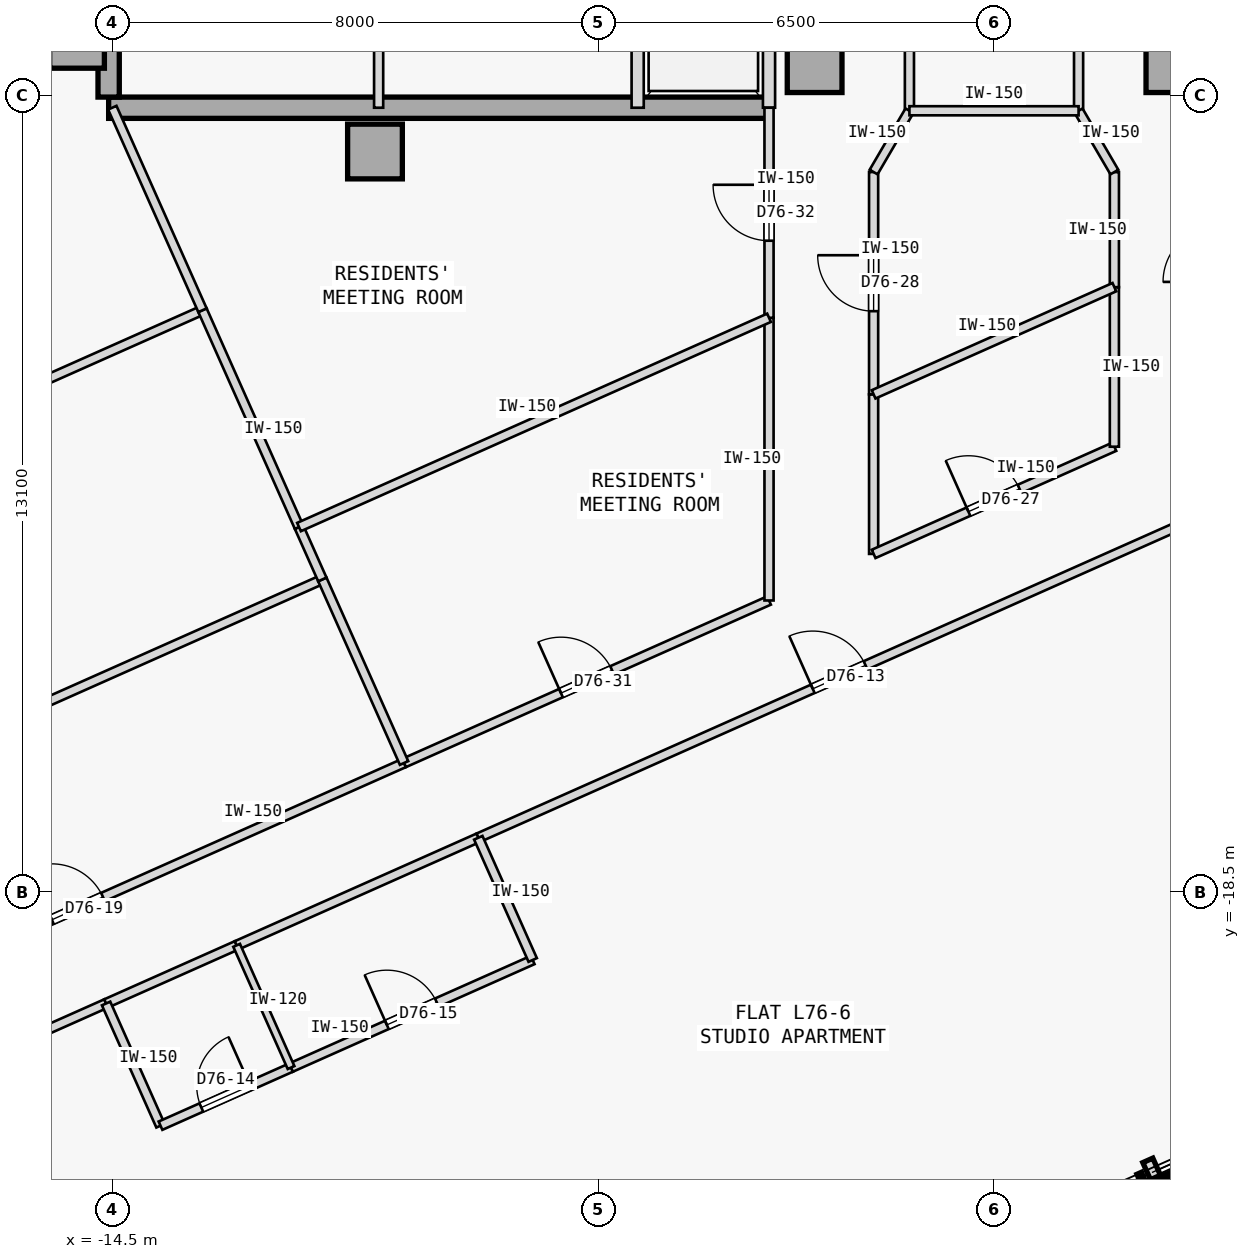
"""IFC4 building model, lengths in metres.
Left out: names, types, materials, properties, quantities, classifications, styles, units other than length and angle.
Written with IfcOpenShell. Run it as: python <this file> out.ifc"""

import sys

from ifc_helpers import new_model, si_unit, direction, frame, frame_2d, origin, origin_2d, place, context, subcontext, project, spatial, rectangle, extrude, element, fill, save


model = new_model("IFC4")
c1 = context("Model", 3, precision=1e-05, world=origin(), true_north=direction((0.0, 1.0)))
c2 = subcontext(c1, "Body", "Model", "MODEL_VIEW")
j1 = project(units=[si_unit("LENGTHUNIT", "METRE"), si_unit("PLANEANGLEUNIT", "RADIAN")], contexts=[c1])
p1 = place(None, origin())
s1 = spatial("IfcSite", under=j1, at=p1, CompositionType="ELEMENT")
p2 = place(p1, origin())
s2 = spatial("IfcBuilding", under=s1, at=p2, CompositionType="ELEMENT")
p3 = place(p2, frame((0.0, 0.0, 285.25)))
s3 = spatial("IfcBuildingStorey", under=s2, at=p3, CompositionType="ELEMENT", Elevation=285.25)
for number, where, z_axis, x_axis in (
    (1, (-15.08, -4.5, 0.0), (0.0, 0.0, 1.0), (1.0, 0.0, 0.0)),
    (2, (-10.18, -6.32, 0.0), (0.0, 0.0, 1.0), (1.0, 0.0, 0.0)),
    (3, (-2.95, -4.9, 0.0), (0.0, 0.0, 1.0), (1.0, 0.0, 0.0)),
    (4, (2.95, -4.9, 0.0), (0.0, 0.0, 1.0), (1.0, 0.0, 0.0)),
):
    element("IfcColumn", number, at=place(p3, frame(where, z_axis=z_axis, x_axis=x_axis)), inside=s3, PredefinedType="COLUMN", context=c2, shape_type="SweptSolid", body=[
        extrude(rectangle(XDim=0.9, YDim=0.9, at=origin_2d()), origin(), (0.0, 0.0, 1.0), 3.35),
    ])
p4 = place(p3, frame((-14.56, -5.6, 0.0), z_axis=(0.0, 0.0, 1.0), x_axis=(1.0, 0.0, 0.0)))
e5 = element("IfcWall", 5, at=p4, inside=s3, PredefinedType="SHEAR", context=c2, shape_type="SweptSolid", body=[
    extrude(rectangle(XDim=10.86, YDim=0.35, at=frame_2d((5.43, 0.0))), origin(), (0.0, 0.0, 1.0), 3.125),
])
p5 = place(p3, frame((-14.56, -5.425, 0.0), z_axis=(0.0, 0.0, 1.0), x_axis=(0.0, 1.0, 0.0)))
e6 = element("IfcWall", 6, at=p5, inside=s3, PredefinedType="SHEAR", context=c2, shape_type="SweptSolid", body=[
    extrude(rectangle(XDim=10.85, YDim=0.35, at=frame_2d((5.425, 0.0))), origin(), (0.0, 0.0, 1.0), 3.125),
])
for number, where, z_axis, x_axis in (
    (7, (-3.7, -5.6, 0.0), (0.0, 0.0, 1.0), (0.0, 1.0, 0.0)),
    (8, (-5.86, -5.6, 0.0), (0.0, 0.0, 1.0), (0.0, 1.0, 0.0)),
):
    element("IfcWall", number, at=place(p3, frame(where, z_axis=z_axis, x_axis=x_axis)), inside=s3, PredefinedType="STANDARD", context=c2, shape_type="SweptSolid", body=[
        extrude(rectangle(XDim=2.65, YDim=0.2, at=frame_2d((1.325, 0.0))), origin(), (0.0, 0.0, 1.0), 3.125),
    ])
p6 = place(p3, frame((-10.12, -5.6, 0.0), z_axis=(0.0, 0.0, 1.0), x_axis=(0.0, 1.0, 0.0)))
e9 = element("IfcWall", 9, at=p6, inside=s3, PredefinedType="PARTITIONING", context=c2, shape_type="SweptSolid", body=[
    extrude(rectangle(XDim=2.65, YDim=0.15, at=frame_2d((1.325, 0.0))), origin(), (0.0, 0.0, 1.0), 3.125),
])
p7 = place(p3, frame((-1.391, -5.65, 0.0), z_axis=(0.0, 0.0, 1.0), x_axis=(-2.1605738e-05, 0.999999999767, 0.0)))
e10 = element("IfcWall", 10, at=p7, inside=s3, PredefinedType="PARTITIONING", context=c2, shape_type="SweptSolid", body=[
    extrude(rectangle(XDim=11.3, YDim=0.15, at=frame_2d((5.65, 0.0))), origin(), (0.0, 0.0, 1.0), 3.125),
])
p8 = place(p3, frame((1.391, -5.65, 0.0), z_axis=(0.0, 0.0, 1.0), x_axis=(4.3206809e-05, 0.999999999067, 0.0)))
e11 = element("IfcWall", 11, at=p8, inside=s3, PredefinedType="PARTITIONING", context=c2, shape_type="SweptSolid", body=[
    extrude(rectangle(XDim=11.301, YDim=0.15, at=frame_2d((5.65, 0.0))), origin(), (0.0, 0.0, 1.0), 3.125),
])
p9 = place(p8, frame((5.176, 0.0, 0.0)))
e12 = element("IfcOpeningElement", 12, at=p9, cuts=e11, PredefinedType="OPENING", context=c2, shape_type="SweptSolid", body=[
    extrude(rectangle(XDim=0.95, YDim=2.15, at=frame_2d((0.475, 1.075))), frame((0.0, 0.085, 0.0), z_axis=(0.0, -1.0, 0.0), x_axis=(1.0, 0.0, 0.0)), (0.0, 0.0, 1.0), 0.17),
])
p10 = place(p3, frame((-19.786, -22.639, 0.0), z_axis=(0.0, 0.0, 1.0), x_axis=(0.913559465571, 0.406705179295, 0.0)))
e13 = element("IfcWall", 13, at=p10, inside=s3, PredefinedType="PARTITIONING", context=c2, shape_type="SweptSolid", body=[
    extrude(rectangle(XDim=5.675, YDim=0.15, at=frame_2d((2.837, 0.0))), origin(), (0.0, 0.0, 1.0), 3.125),
])
p11 = place(p3, frame((-8.481, -17.605, 0.0), z_axis=(0.0, 0.0, 1.0), x_axis=(0.913546352883, 0.406734632328, 0.0)))
e14 = element("IfcWall", 14, at=p11, inside=s3, PredefinedType="PARTITIONING", context=c2, shape_type="SweptSolid", body=[
    extrude(rectangle(XDim=12.993, YDim=0.15, at=frame_2d((6.497, 0.0))), origin(), (0.0, 0.0, 1.0), 3.125),
])
p12 = place(p11, frame((6.021, 0.0, 0.0)))
e15 = element("IfcOpeningElement", 15, at=p12, cuts=e14, PredefinedType="OPENING", context=c2, shape_type="SweptSolid", body=[
    extrude(rectangle(XDim=0.95, YDim=2.15, at=frame_2d((0.475, 1.075))), frame((0.0, 0.085, 0.0), z_axis=(0.0, -1.0, 0.0), x_axis=(1.0, 0.0, 0.0)), (0.0, 0.0, 1.0), 0.17),
])
p13 = place(p3, frame((-14.602, -20.331, 0.0), z_axis=(0.0, 0.0, 1.0), x_axis=(0.913502828817, 0.406832375486, 0.0)))
e16 = element("IfcWall", 16, at=p13, inside=s3, PredefinedType="PARTITIONING", context=c2, shape_type="SweptSolid", body=[
    extrude(rectangle(XDim=2.35, YDim=0.15, at=frame_2d((1.175, 0.0))), origin(), (0.0, 0.0, 1.0), 3.125),
])
p14 = place(p3, frame((-12.455, -19.375, 0.0), z_axis=(0.0, 0.0, 1.0), x_axis=(0.913545193015, 0.406737237438, 0.0)))
e17 = element("IfcWall", 17, at=p14, inside=s3, PredefinedType="PARTITIONING", context=c2, shape_type="SweptSolid", body=[
    extrude(rectangle(XDim=4.35, YDim=0.15, at=frame_2d((2.175, 0.0))), origin(), (0.0, 0.0, 1.0), 3.125),
])
p15 = place(p3, frame((-20.445, -21.159, 0.0), z_axis=(0.0, 0.0, 1.0), x_axis=(0.913547681516, 0.406731648137, 0.0)))
e18 = element("IfcWall", 18, at=p15, inside=s3, PredefinedType="PARTITIONING", context=c2, shape_type="SweptSolid", body=[
    extrude(rectangle(XDim=11.76, YDim=0.15, at=frame_2d((5.88, 0.0))), origin(), (0.0, 0.0, 1.0), 3.125),
])
p16 = place(p15, frame((5.42, 0.0, 0.0)))
e19 = element("IfcOpeningElement", 19, at=p16, cuts=e18, PredefinedType="OPENING", context=c2, shape_type="SweptSolid", body=[
    extrude(rectangle(XDim=0.92, YDim=2.15, at=frame_2d((0.46, 1.075))), frame((0.0, 0.085, 0.0), z_axis=(0.0, -1.0, 0.0), x_axis=(1.0, 0.0, 0.0)), (0.0, 0.0, 1.0), 0.17),
])
p17 = place(p3, frame((-1.98, -12.938, 0.0), z_axis=(0.0, 0.0, 1.0), x_axis=(-9.3049223e-05, 0.999999995671, 0.0)))
e20 = element("IfcWall", 20, at=p17, inside=s3, PredefinedType="PARTITIONING", context=c2, shape_type="SweptSolid", body=[
    extrude(rectangle(XDim=2.624, YDim=0.15, at=frame_2d((1.312, 0.0))), origin(), (0.0, 0.0, 1.0), 3.125),
])
p18 = place(p3, frame((-1.98, -12.938, 0.0), z_axis=(0.0, 0.0, 1.0), x_axis=(0.913530252303, 0.406770793111, 0.0)))
e21 = element("IfcWall", 21, at=p18, inside=s3, PredefinedType="PARTITIONING", context=c2, shape_type="SweptSolid", body=[
    extrude(rectangle(XDim=4.334, YDim=0.15, at=frame_2d((2.167, 0.0))), origin(), (0.0, 0.0, 1.0), 3.125),
])
p19 = place(p18, frame((1.707, 0.0, 0.0)))
e22 = element("IfcOpeningElement", 22, at=p19, cuts=e21, PredefinedType="OPENING", context=c2, shape_type="SweptSolid", body=[
    extrude(rectangle(XDim=0.92, YDim=2.15, at=frame_2d((0.46, 1.075))), frame((0.0, 0.085, 0.0), z_axis=(0.0, -1.0, 0.0), x_axis=(1.0, 0.0, 0.0)), (0.0, 0.0, 1.0), 0.17),
])
p20 = place(p3, frame((1.979, -11.175, 0.0), z_axis=(0.0, 0.0, 1.0), x_axis=(0.0, 1.0, 0.0)))
e23 = element("IfcWall", 23, at=p20, inside=s3, PredefinedType="PARTITIONING", context=c2, shape_type="SweptSolid", body=[
    extrude(rectangle(XDim=2.624, YDim=0.15, at=frame_2d((1.312, 0.0))), origin(), (0.0, 0.0, 1.0), 3.125),
])
p21 = place(p3, frame((-1.98, -10.314, 0.0), z_axis=(0.0, 0.0, 1.0), x_axis=(0.0, 1.0, 0.0)))
e24 = element("IfcWall", 24, at=p21, inside=s3, PredefinedType="PARTITIONING", context=c2, shape_type="SweptSolid", body=[
    extrude(rectangle(XDim=3.656, YDim=0.15, at=frame_2d((1.828, 0.0))), origin(), (0.0, 0.0, 1.0), 3.125),
])
p22 = place(p21, frame((1.368, 0.0, 0.0)))
e25 = element("IfcOpeningElement", 25, at=p22, cuts=e24, PredefinedType="OPENING", context=c2, shape_type="SweptSolid", body=[
    extrude(rectangle(XDim=0.92, YDim=2.15, at=frame_2d((0.46, 1.075))), frame((0.0, 0.085, 0.0), z_axis=(0.0, -1.0, 0.0), x_axis=(1.0, 0.0, 0.0)), (0.0, 0.0, 1.0), 0.17),
])
p23 = place(p3, frame((-1.98, -6.658, 0.0), z_axis=(0.0, 0.0, 1.0), x_axis=(0.504651025514, 0.863323428645, 0.0)))
e26 = element("IfcWall", 26, at=p23, inside=s3, PredefinedType="PARTITIONING", context=c2, shape_type="SweptSolid", body=[
    extrude(rectangle(XDim=1.167, YDim=0.15, at=frame_2d((0.584, 0.0))), origin(), (0.0, 0.0, 1.0), 3.125),
])
p24 = place(p3, frame((1.979, -8.551, 0.0), z_axis=(0.0, 0.0, 1.0), x_axis=(0.00025809781, 0.999999966693, 0.0)))
e27 = element("IfcWall", 27, at=p24, inside=s3, PredefinedType="PARTITIONING", context=c2, shape_type="SweptSolid", body=[
    extrude(rectangle(XDim=1.892, YDim=0.15, at=frame_2d((0.946, 0.0))), origin(), (0.0, 0.0, 1.0), 3.125),
])
p25 = place(p3, frame((1.391, -5.65, 0.0), z_axis=(0.0, 0.0, 1.0), x_axis=(0.504339173621, -0.863505644424, 0.0)))
e28 = element("IfcWall", 28, at=p25, inside=s3, PredefinedType="PARTITIONING", context=c2, shape_type="SweptSolid", body=[
    extrude(rectangle(XDim=1.167, YDim=0.15, at=frame_2d((0.583, 0.0))), origin(), (0.0, 0.0, 1.0), 3.125),
])
p26 = place(p3, frame((-9.702, -16.375, 0.0), z_axis=(0.0, 0.0, 1.0), x_axis=(0.913552389019, 0.406721074594, 0.0)))
e29 = element("IfcWall", 29, at=p26, inside=s3, PredefinedType="PARTITIONING", context=c2, shape_type="SweptSolid", body=[
    extrude(rectangle(XDim=6.57, YDim=0.15, at=frame_2d((3.285, 0.0))), origin(), (0.0, 0.0, 1.0), 3.125),
])
p27 = place(p26, frame((2.825, 0.0, 0.0)))
e30 = element("IfcOpeningElement", 30, at=p27, cuts=e29, PredefinedType="OPENING", context=c2, shape_type="SweptSolid", body=[
    extrude(rectangle(XDim=0.92, YDim=2.15, at=frame_2d((0.46, 1.075))), frame((0.0, 0.085, 0.0), z_axis=(0.0, -1.0, 0.0), x_axis=(1.0, 0.0, 0.0)), (0.0, 0.0, 1.0), 0.17),
])
p28 = place(p3, frame((-3.7, -13.703, 0.0), z_axis=(0.0, 0.0, 1.0), x_axis=(5.2512734e-05, 0.999999998621, 0.0)))
e31 = element("IfcWall", 31, at=p28, inside=s3, PredefinedType="PARTITIONING", context=c2, shape_type="SweptSolid", body=[
    extrude(rectangle(XDim=4.649, YDim=0.15, at=frame_2d((2.325, 0.0))), origin(), (0.0, 0.0, 1.0), 3.125),
])
p29 = place(p3, frame((-3.7, -9.054, 0.0), z_axis=(0.0, 0.0, 1.0), x_axis=(-7.0671378e-05, 0.999999997503, 0.0)))
e32 = element("IfcWall", 32, at=p29, inside=s3, PredefinedType="PARTITIONING", context=c2, shape_type="SweptSolid", body=[
    extrude(rectangle(XDim=3.455, YDim=0.15, at=frame_2d((1.727, 0.0))), origin(), (0.0, 0.0, 1.0), 3.125),
])
p30 = place(p29, frame((1.267, 0.0, 0.0)))
e33 = element("IfcOpeningElement", 33, at=p30, cuts=e32, PredefinedType="OPENING", context=c2, shape_type="SweptSolid", body=[
    extrude(rectangle(XDim=0.92, YDim=2.15, at=frame_2d((0.46, 1.075))), frame((0.0, 0.085, 0.0), z_axis=(0.0, -1.0, 0.0), x_axis=(1.0, 0.0, 0.0)), (0.0, 0.0, 1.0), 0.17),
])
p31 = place(p3, frame((-1.391, -5.65, 0.0), z_axis=(0.0, 0.0, 1.0), x_axis=(0.999999984594, -0.000175530979, 0.0)))
e34 = element("IfcWall", 34, at=p31, inside=s3, PredefinedType="PARTITIONING", context=c2, shape_type="SweptSolid", body=[
    extrude(rectangle(XDim=2.782, YDim=0.15, at=frame_2d((1.391, 0.0))), origin(), (0.0, 0.0, 1.0), 3.125),
])
p32 = place(p3, frame((-13.707, -22.34, 0.0), z_axis=(0.0, 0.0, 1.0), x_axis=(-0.406725294076, 0.913550510459, 0.0)))
e35 = element("IfcWall", 35, at=p32, inside=s3, PredefinedType="PARTITIONING", context=c2, shape_type="SweptSolid", body=[
    extrude(rectangle(XDim=2.2, YDim=0.15, at=frame_2d((1.1, 0.0))), origin(), (0.0, 0.0, 1.0), 3.125),
])
p33 = place(p3, frame((-13.707, -22.34, 0.0), z_axis=(0.0, 0.0, 1.0), x_axis=(0.913541436194, 0.406745675276, 0.0)))
e36 = element("IfcWall", 36, at=p33, inside=s3, PredefinedType="PARTITIONING", context=c2, shape_type="SweptSolid", body=[
    extrude(rectangle(XDim=2.35, YDim=0.15, at=frame_2d((1.175, 0.0))), origin(), (0.0, 0.0, 1.0), 3.125),
])
p34 = place(p33, frame((0.735, 0.0, 0.0)))
e37 = element("IfcOpeningElement", 37, at=p34, cuts=e36, PredefinedType="OPENING", context=c2, shape_type="SweptSolid", body=[
    extrude(rectangle(XDim=0.88, YDim=2.15, at=frame_2d((0.44, 1.075))), frame((0.0, 0.085, 0.0), z_axis=(0.0, -1.0, 0.0), x_axis=(1.0, 0.0, 0.0)), (0.0, 0.0, 1.0), 0.17),
])
p35 = place(p3, frame((-11.56, -21.385, 0.0), z_axis=(0.0, 0.0, 1.0), x_axis=(0.913533624044, 0.406763220732, 0.0)))
e38 = element("IfcWall", 38, at=p35, inside=s3, PredefinedType="PARTITIONING", context=c2, shape_type="SweptSolid", body=[
    extrude(rectangle(XDim=4.35, YDim=0.15, at=frame_2d((2.175, 0.0))), origin(), (0.0, 0.0, 1.0), 3.125),
])
p36 = place(p35, frame((1.725, 0.0, 0.0)))
e39 = element("IfcOpeningElement", 39, at=p36, cuts=e38, PredefinedType="OPENING", context=c2, shape_type="SweptSolid", body=[
    extrude(rectangle(XDim=0.9, YDim=2.15, at=frame_2d((0.45, 1.075))), frame((0.0, 0.085, 0.0), z_axis=(0.0, -1.0, 0.0), x_axis=(1.0, 0.0, 0.0)), (0.0, 0.0, 1.0), 0.17),
])
p37 = place(p3, frame((-7.586, -19.615, 0.0), z_axis=(0.0, 0.0, 1.0), x_axis=(-0.406817905151, 0.913509273105, 0.0)))
e40 = element("IfcWall", 40, at=p37, inside=s3, PredefinedType="PARTITIONING", context=c2, shape_type="SweptSolid", body=[
    extrude(rectangle(XDim=2.2, YDim=0.15, at=frame_2d((1.1, 0.0))), origin(), (0.0, 0.0, 1.0), 3.125),
])
p38 = place(p3, frame((-11.56, -21.385, 0.0), z_axis=(0.0, 0.0, 1.0), x_axis=(-0.406684063321, 0.913568865845, 0.0)))
e41 = element("IfcWall", 41, at=p38, inside=s3, PredefinedType="PARTITIONING", context=c2, shape_type="SweptSolid", body=[
    extrude(rectangle(XDim=2.2, YDim=0.12, at=frame_2d((1.1, 0.0))), origin(), (0.0, 0.0, 1.0), 3.125),
])
p39 = place(p3, frame((-21.789, -18.14, 0.0), z_axis=(0.0, 0.0, 1.0), x_axis=(0.913544247064, 0.406739362069, 0.0)))
e42 = element("IfcWall", 42, at=p39, inside=s3, PredefinedType="PARTITIONING", context=c2, shape_type="SweptSolid", body=[
    extrude(rectangle(XDim=11.76, YDim=0.15, at=frame_2d((5.88, 0.0))), origin(), (0.0, 0.0, 1.0), 3.125),
])
p40 = place(p39, frame((5.42, 0.0, 0.0)))
e43 = element("IfcOpeningElement", 43, at=p40, cuts=e42, PredefinedType="OPENING", context=c2, shape_type="SweptSolid", body=[
    extrude(rectangle(XDim=0.92, YDim=2.15, at=frame_2d((0.46, 1.075))), frame((0.0, 0.085, 0.0), z_axis=(0.0, -1.0, 0.0), x_axis=(1.0, 0.0, 0.0)), (0.0, 0.0, 1.0), 0.17),
])
p41 = place(p3, frame((-9.702, -16.375, 0.0), z_axis=(0.0, 0.0, 1.0), x_axis=(-0.406775972158, 0.913527946193, 0.0)))
e44 = element("IfcWall", 44, at=p41, inside=s3, PredefinedType="PARTITIONING", context=c2, shape_type="SweptSolid", body=[
    extrude(rectangle(XDim=3.304, YDim=0.15, at=frame_2d((1.652, 0.0))), origin(), (0.0, 0.0, 1.0), 3.125),
])
p42 = place(p3, frame((-23.76, -13.713, 0.0), z_axis=(0.0, 0.0, 1.0), x_axis=(0.913544247064, 0.406739362069, 0.0)))
e45 = element("IfcWall", 45, at=p42, inside=s3, PredefinedType="PARTITIONING", context=c2, shape_type="SweptSolid", body=[
    extrude(rectangle(XDim=11.76, YDim=0.15, at=frame_2d((5.88, 0.0))), origin(), (0.0, 0.0, 1.0), 3.125),
])
p43 = place(p42, frame((5.42, 0.0, 0.0)))
e46 = element("IfcOpeningElement", 46, at=p43, cuts=e45, PredefinedType="OPENING", context=c2, shape_type="SweptSolid", body=[
    extrude(rectangle(XDim=0.92, YDim=2.15, at=frame_2d((0.46, 1.075))), frame((0.0, 0.085, 0.0), z_axis=(0.0, -1.0, 0.0), x_axis=(1.0, 0.0, 0.0)), (0.0, 0.0, 1.0), 0.17),
])
p44 = place(p3, frame((-11.046, -13.357, 0.0), z_axis=(0.0, 0.0, 1.0), x_axis=(-0.406474743084, 0.913662018054, 0.0)))
e47 = element("IfcWall", 47, at=p44, inside=s3, PredefinedType="PARTITIONING", context=c2, shape_type="SweptSolid", body=[
    extrude(rectangle(XDim=0.943, YDim=0.15, at=frame_2d((0.471, 0.0))), origin(), (0.0, 0.0, 1.0), 3.125),
])
p45 = place(p3, frame((-11.429, -12.496, 0.0), z_axis=(0.0, 0.0, 1.0), x_axis=(-0.406782597231, 0.91352499615, 0.0)))
e48 = element("IfcWall", 48, at=p45, inside=s3, PredefinedType="PARTITIONING", context=c2, shape_type="SweptSolid", body=[
    extrude(rectangle(XDim=3.903, YDim=0.15, at=frame_2d((1.951, 0.0))), origin(), (0.0, 0.0, 1.0), 3.125),
])
p46 = place(p3, frame((-13.017, -8.93, 0.0), z_axis=(0.0, 0.0, 1.0), x_axis=(-0.406722395322, 0.913551801018, 0.0)))
e49 = element("IfcWall", 49, at=p46, inside=s3, PredefinedType="PARTITIONING", context=c2, shape_type="SweptSolid", body=[
    extrude(rectangle(XDim=3.646, YDim=0.15, at=frame_2d((1.823, 0.0))), origin(), (0.0, 0.0, 1.0), 3.125),
])
p47 = place(p3, frame((-1.98, -10.314, 0.0), z_axis=(0.0, 0.0, 1.0), x_axis=(0.913539572356, 0.406749861388, 0.0)))
e50 = element("IfcWall", 50, at=p47, inside=s3, PredefinedType="PARTITIONING", context=c2, shape_type="SweptSolid", body=[
    extrude(rectangle(XDim=4.334, YDim=0.15, at=frame_2d((2.167, 0.0))), origin(), (0.0, 0.0, 1.0), 3.125),
])
p48 = place(p3, frame((-11.429, -12.496, 0.0), z_axis=(0.0, 0.0, 1.0), x_axis=(0.913544816238, 0.406738083692, 0.0)))
e51 = element("IfcWall", 51, at=p48, inside=s3, PredefinedType="PARTITIONING", context=c2, shape_type="SweptSolid", body=[
    extrude(rectangle(XDim=8.461, YDim=0.15, at=frame_2d((4.23, 0.0))), origin(), (0.0, 0.0, 1.0), 3.125),
])
p49 = place(p12, origin())
e52 = element("IfcDoor", 52, at=p49, inside=s3, OperationType="SINGLE_SWING_LEFT", PredefinedType="DOOR", context=c2, shape_type="SweptSolid", body=[
    extrude(rectangle(XDim=0.95, YDim=2.15, at=frame_2d((0.475, 1.075))), frame((0.0, 0.025, 0.0), z_axis=(0.0, -1.0, 0.0), x_axis=(1.0, 0.0, 0.0)), (0.0, 0.0, 1.0), 0.05),
])
fill(e15, e52)
p50 = place(p34, origin())
e53 = element("IfcDoor", 53, at=p50, inside=s3, OperationType="SINGLE_SWING_RIGHT", PredefinedType="DOOR", context=c2, shape_type="SweptSolid", body=[
    extrude(rectangle(XDim=0.88, YDim=2.15, at=frame_2d((0.44, 1.075))), frame((0.0, 0.025, 0.0), z_axis=(0.0, -1.0, 0.0), x_axis=(1.0, 0.0, 0.0)), (0.0, 0.0, 1.0), 0.05),
])
fill(e37, e53)
p51 = place(p36, origin())
e54 = element("IfcDoor", 54, at=p51, inside=s3, OperationType="SINGLE_SWING_LEFT", PredefinedType="DOOR", context=c2, shape_type="SweptSolid", body=[
    extrude(rectangle(XDim=0.9, YDim=2.15, at=frame_2d((0.45, 1.075))), frame((0.0, 0.025, 0.0), z_axis=(0.0, -1.0, 0.0), x_axis=(1.0, 0.0, 0.0)), (0.0, 0.0, 1.0), 0.05),
])
fill(e39, e54)
p52 = place(p16, origin())
e55 = element("IfcDoor", 55, at=p52, inside=s3, OperationType="SINGLE_SWING_LEFT", PredefinedType="DOOR", context=c2, shape_type="SweptSolid", body=[
    extrude(rectangle(XDim=0.92, YDim=2.15, at=frame_2d((0.46, 1.075))), frame((0.0, 0.025, 0.0), z_axis=(0.0, -1.0, 0.0), x_axis=(1.0, 0.0, 0.0)), (0.0, 0.0, 1.0), 0.05),
])
fill(e19, e55)
p53 = place(p19, origin())
e56 = element("IfcDoor", 56, at=p53, inside=s3, OperationType="SINGLE_SWING_LEFT", PredefinedType="DOOR", context=c2, shape_type="SweptSolid", body=[
    extrude(rectangle(XDim=0.92, YDim=2.15, at=frame_2d((0.46, 1.075))), frame((0.0, 0.025, 0.0), z_axis=(0.0, -1.0, 0.0), x_axis=(1.0, 0.0, 0.0)), (0.0, 0.0, 1.0), 0.05),
])
fill(e22, e56)
p54 = place(p22, origin())
e57 = element("IfcDoor", 57, at=p54, inside=s3, OperationType="SINGLE_SWING_RIGHT", PredefinedType="DOOR", context=c2, shape_type="SweptSolid", body=[
    extrude(rectangle(XDim=0.92, YDim=2.15, at=frame_2d((0.46, 1.075))), frame((0.0, 0.025, 0.0), z_axis=(0.0, -1.0, 0.0), x_axis=(1.0, 0.0, 0.0)), (0.0, 0.0, 1.0), 0.05),
])
fill(e25, e57)
p55 = place(p27, origin())
e58 = element("IfcDoor", 58, at=p55, inside=s3, OperationType="SINGLE_SWING_LEFT", PredefinedType="DOOR", context=c2, shape_type="SweptSolid", body=[
    extrude(rectangle(XDim=0.92, YDim=2.15, at=frame_2d((0.46, 1.075))), frame((0.0, 0.025, 0.0), z_axis=(0.0, -1.0, 0.0), x_axis=(1.0, 0.0, 0.0)), (0.0, 0.0, 1.0), 0.05),
])
fill(e30, e58)
p56 = place(p30, origin())
e59 = element("IfcDoor", 59, at=p56, inside=s3, OperationType="SINGLE_SWING_RIGHT", PredefinedType="DOOR", context=c2, shape_type="SweptSolid", body=[
    extrude(rectangle(XDim=0.92, YDim=2.15, at=frame_2d((0.46, 1.075))), frame((0.0, 0.025, 0.0), z_axis=(0.0, -1.0, 0.0), x_axis=(1.0, 0.0, 0.0)), (0.0, 0.0, 1.0), 0.05),
])
fill(e33, e59)
save(model, sys.argv[1])
